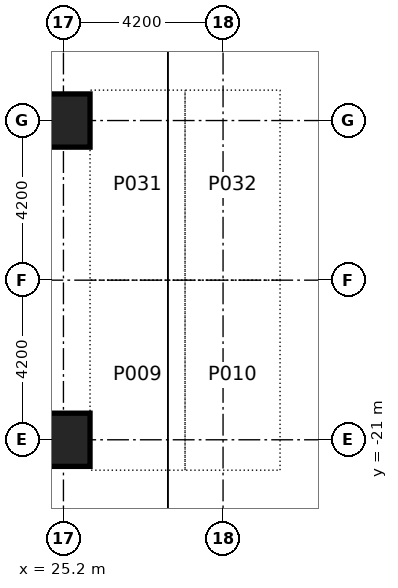
"""IFC4 building model, lengths in metres.
Left out: names, types, materials, properties, quantities, classifications, styles, units other than length and angle.
Written with IfcOpenShell. Run it as: python <this file> out.ifc"""

import sys

from ifc_helpers import new_model, si_unit, direction, frame, origin, origin_2d, place, context, subcontext, project, spatial, rectangle, extrude, element, save


model = new_model("IFC4")
c1 = context("Model", 3, precision=1e-05, world=origin(), true_north=direction((0.0, 1.0)))
c2 = subcontext(c1, "Body", "Model", "MODEL_VIEW")
j1 = project(units=[si_unit("LENGTHUNIT", "METRE"), si_unit("PLANEANGLEUNIT", "RADIAN")], contexts=[c1])
p1 = place(None, origin())
s1 = spatial("IfcSite", under=j1, at=p1, CompositionType="ELEMENT")
p2 = place(p1, origin())
s2 = spatial("IfcBuilding", under=s1, at=p2, CompositionType="ELEMENT")
p3 = place(p2, frame((0.0, 0.0, -8.4)))
s3 = spatial("IfcBuildingStorey", under=s2, at=p3, CompositionType="ELEMENT", Elevation=-8.4)
p4 = place(p3, frame((25.2, -12.6, 0.0), z_axis=(0.0, 0.0, 1.0), x_axis=(1.0, 0.0, 0.0)))
e1 = element("IfcColumn", 1, at=p4, inside=s3, PredefinedType="COLUMN", context=c2, shape_type="SweptSolid", body=[
    extrude(rectangle(XDim=1.4, YDim=1.4, at=origin_2d()), origin(), (0.0, 0.0, 1.0), 3.85),
])
p5 = place(p3, frame((25.2, -21.0, 0.0), z_axis=(0.0, 0.0, 1.0), x_axis=(1.0, 0.0, 0.0)))
e2 = element("IfcColumn", 2, at=p5, inside=s3, PredefinedType="COLUMN", context=c2, shape_type="SweptSolid", body=[
    extrude(rectangle(XDim=1.4, YDim=1.4, at=origin_2d()), origin(), (0.0, 0.0, 1.0), 4.2),
])
save(model, sys.argv[1])
